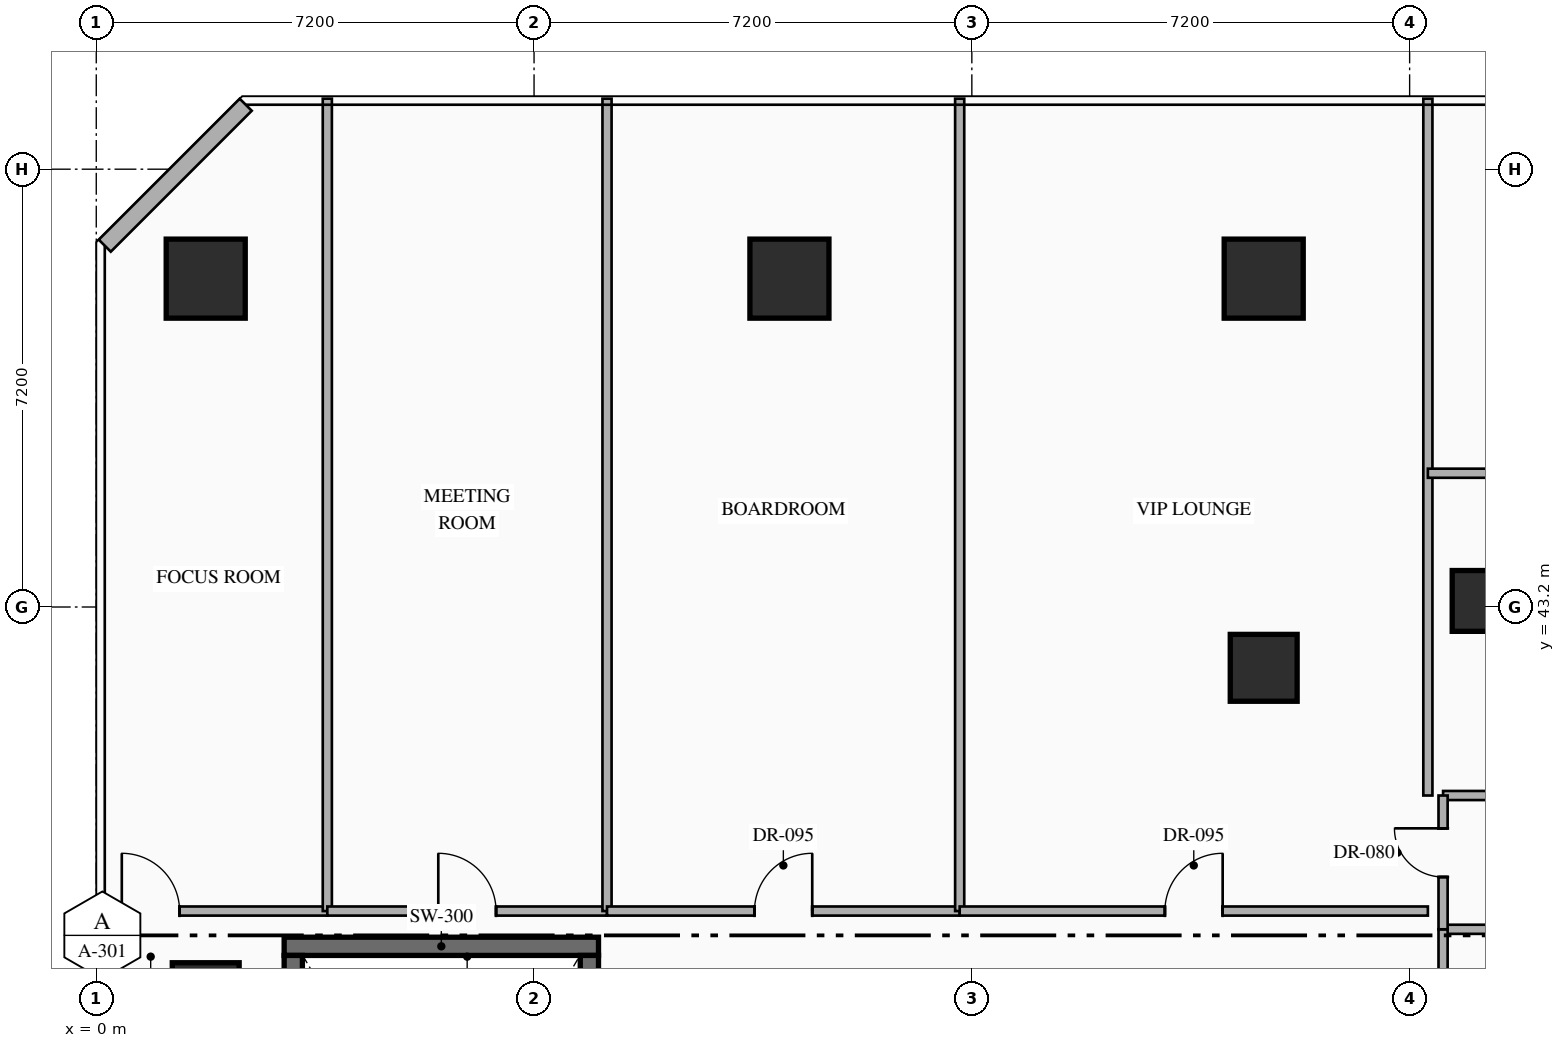
"""IFC4 building model, lengths in metres.
Left out: names, types, materials, properties, quantities, classifications, styles, units other than length and angle.
Written with IfcOpenShell. Run it as: python <this file> out.ifc"""

import sys

from ifc_helpers import new_model, si_unit, direction, frame, frame_2d, origin, origin_2d, place, context, subcontext, project, spatial, rectangle, hollow_rectangle, extrude, element, fill, save


model = new_model("IFC4")
c1 = context("Model", 3, precision=1e-05, world=origin(), true_north=direction((0.0, 1.0)))
c2 = subcontext(c1, "Body", "Model", "MODEL_VIEW")
j1 = project(units=[si_unit("LENGTHUNIT", "METRE"), si_unit("PLANEANGLEUNIT", "RADIAN")], contexts=[c1])
p1 = place(None, origin())
s1 = spatial("IfcSite", under=j1, at=p1, CompositionType="ELEMENT")
p2 = place(p1, origin())
s2 = spatial("IfcBuilding", under=s1, at=p2, CompositionType="ELEMENT")
p3 = place(p2, frame((0.0, 0.0, 16.2)))
s3 = spatial("IfcBuildingStorey", under=s2, at=p3, CompositionType="ELEMENT", Elevation=16.2)
p4 = place(p3, frame((3.09, 37.62, 0.0), z_axis=(0.0, 0.0, 1.0), x_axis=(1.0, 0.0, 0.0)))
e1 = element("IfcWall", 1, at=p4, inside=s3, PredefinedType="SHEAR", context=c2, shape_type="SweptSolid", body=[
    extrude(rectangle(XDim=5.17, YDim=0.3, at=frame_2d((2.585, 0.0))), origin(), (0.0, 0.0, 1.0), 5.4),
])
for number, where, z_axis, x_axis in (
    (2, (3.24, 27.59, 0.0), (0.0, 0.0, 1.0), (0.0, 1.0, 0.0)),
    (3, (8.11, 27.59, 0.0), (0.0, 0.0, 1.0), (0.0, 1.0, 0.0)),
):
    element("IfcWall", number, at=place(p3, frame(where, z_axis=z_axis, x_axis=x_axis)), inside=s3, PredefinedType="SHEAR", context=c2, shape_type="SweptSolid", body=[
        extrude(rectangle(XDim=9.88, YDim=0.3, at=frame_2d((4.94, 0.0))), origin(), (0.0, 0.0, 1.0), 5.4),
    ])
p5 = place(p3, frame((1.8, 48.6, 0.0), z_axis=(0.0, 0.0, 1.0), x_axis=(1.0, 0.0, 0.0)))
e4 = element("IfcColumn", 4, at=p5, inside=s3, PredefinedType="COLUMN", context=c2, shape_type="SweptSolid", body=[
    extrude(rectangle(XDim=1.3, YDim=1.3, at=origin_2d()), origin(), (0.0, 0.0, 1.0), 5.4),
])
p6 = place(p3, frame((1.8, 36.8, 0.0), z_axis=(0.0, 0.0, 1.0), x_axis=(1.0, 0.0, 0.0)))
e5 = element("IfcColumn", 5, at=p6, inside=s3, PredefinedType="COLUMN", context=c2, shape_type="SweptSolid", body=[
    extrude(hollow_rectangle(XDim=1.1, YDim=1.1, WallThickness=0.04, at=origin_2d()), origin(), (0.0, 0.0, 1.0), 5.4),
])
for number, where, z_axis, x_axis in (
    (6, (11.4, 48.6, 0.0), (0.0, 0.0, 1.0), (1.0, 0.0, 0.0)),
    (7, (19.2, 48.6, 0.0), (0.0, 0.0, 1.0), (1.0, 0.0, 0.0)),
):
    element("IfcColumn", number, at=place(p3, frame(where, z_axis=z_axis, x_axis=x_axis)), inside=s3, PredefinedType="COLUMN", context=c2, shape_type="SweptSolid", body=[
        extrude(rectangle(XDim=1.3, YDim=1.3, at=origin_2d()), origin(), (0.0, 0.0, 1.0), 5.4),
    ])
p7 = place(p3, frame((19.2, 42.2, 0.0), z_axis=(0.0, 0.0, 1.0), x_axis=(1.0, 0.0, 0.0)))
e8 = element("IfcColumn", 8, at=p7, inside=s3, PredefinedType="COLUMN", context=c2, shape_type="SweptSolid", body=[
    extrude(hollow_rectangle(XDim=1.1, YDim=1.1, WallThickness=0.04, at=origin_2d()), origin(), (0.0, 0.0, 1.0), 5.4),
])
p8 = place(p3, frame((22.8, 43.3, 0.0), z_axis=(0.0, 0.0, 1.0), x_axis=(1.0, 0.0, 0.0)))
e9 = element("IfcColumn", 9, at=p8, inside=s3, PredefinedType="COLUMN", context=c2, shape_type="SweptSolid", body=[
    extrude(hollow_rectangle(XDim=1.0, YDim=1.0, WallThickness=0.038, at=origin_2d()), origin(), (0.0, 0.0, 1.0), 5.4),
])
p9 = place(p3, frame((0.14, 49.142, 0.0), z_axis=(0.0, 0.0, 1.0), x_axis=(0.707144017911, 0.707069542501, 0.0)))
e10 = element("IfcWall", 10, at=p9, inside=s3, PredefinedType="STANDARD", context=c2, shape_type="SweptSolid", body=[
    extrude(rectangle(XDim=3.278, YDim=0.28, at=frame_2d((1.639, 0.0))), origin(), (0.0, 0.0, 1.0), 5.1),
])
for number, where, z_axis, x_axis in (
    (11, (22.15, 40.1, 0.0), (0.0, 0.0, 1.0), (1.0, 0.0, 0.0)),
    (12, (22.15, 37.9, 0.0), (0.0, 0.0, 1.0), (1.0, 0.0, 0.0)),
):
    element("IfcWall", number, at=place(p3, frame(where, z_axis=z_axis, x_axis=x_axis)), inside=s3, PredefinedType="PARTITIONING", context=c2, shape_type="SweptSolid", body=[
        extrude(rectangle(XDim=3.3, YDim=0.15, at=frame_2d((1.65, 0.0))), origin(), (0.0, 0.0, 1.0), 5.1),
    ])
p10 = place(p3, frame((22.15, 35.7, 0.0), z_axis=(0.0, 0.0, 1.0), x_axis=(0.0, 1.0, 0.0)))
e13 = element("IfcWall", 13, at=p10, inside=s3, PredefinedType="PARTITIONING", context=c2, shape_type="SweptSolid", body=[
    extrude(rectangle(XDim=2.2, YDim=0.15, at=frame_2d((1.1, 0.0))), origin(), (0.0, 0.0, 1.0), 5.1),
])
p11 = place(p10, frame((0.7, 0.0, 0.0)))
e14 = element("IfcOpeningElement", 14, at=p11, cuts=e13, PredefinedType="OPENING", context=c2, shape_type="SweptSolid", body=[
    extrude(rectangle(XDim=0.8, YDim=2.06, at=frame_2d((0.4, 1.03))), frame((0.0, 0.085, 0.0), z_axis=(0.0, -1.0, 0.0), x_axis=(1.0, 0.0, 0.0)), (0.0, 0.0, 1.0), 0.17),
])
p12 = place(p3, frame((22.15, 37.9, 0.0), z_axis=(0.0, 0.0, 1.0), x_axis=(0.0, 1.0, 0.0)))
e15 = element("IfcWall", 15, at=p12, inside=s3, PredefinedType="PARTITIONING", context=c2, shape_type="SweptSolid", body=[
    extrude(rectangle(XDim=2.2, YDim=0.15, at=frame_2d((1.1, 0.0))), origin(), (0.0, 0.0, 1.0), 5.1),
])
p13 = place(p12, frame((0.86, 0.0, 0.0)))
e16 = element("IfcOpeningElement", 16, at=p13, cuts=e15, PredefinedType="OPENING", context=c2, shape_type="SweptSolid", body=[
    extrude(rectangle(XDim=0.8, YDim=2.06, at=frame_2d((0.4, 1.03))), frame((0.0, 0.085, 0.0), z_axis=(0.0, -1.0, 0.0), x_axis=(1.0, 0.0, 0.0)), (0.0, 0.0, 1.0), 0.17),
])
p14 = place(p3, frame((0.04, 38.2, 0.0), z_axis=(0.0, 0.0, 1.0), x_axis=(1.0, 0.0, 0.0)))
e17 = element("IfcWall", 17, at=p14, inside=s3, PredefinedType="PARTITIONING", context=c2, shape_type="SweptSolid", body=[
    extrude(rectangle(XDim=3.76, YDim=0.15, at=frame_2d((1.88, 0.0))), origin(), (0.0, 0.0, 1.0), 5.1),
])
p15 = place(p14, frame((0.38, 0.0, 0.0)))
e18 = element("IfcOpeningElement", 18, at=p15, cuts=e17, PredefinedType="OPENING", context=c2, shape_type="SweptSolid", body=[
    extrude(rectangle(XDim=0.95, YDim=2.15, at=frame_2d((0.475, 1.075))), frame((0.0, 0.085, 0.0), z_axis=(0.0, -1.0, 0.0), x_axis=(1.0, 0.0, 0.0)), (0.0, 0.0, 1.0), 0.17),
])
p16 = place(p3, frame((3.8, 38.2, 0.0), z_axis=(0.0, 0.0, 1.0), x_axis=(0.0, 1.0, 0.0)))
e19 = element("IfcWall", 19, at=p16, inside=s3, PredefinedType="PARTITIONING", context=c2, shape_type="SweptSolid", body=[
    extrude(rectangle(XDim=13.36, YDim=0.15, at=frame_2d((6.68, 0.0))), origin(), (0.0, 0.0, 1.0), 5.1),
])
p17 = place(p3, frame((3.8, 38.2, 0.0), z_axis=(0.0, 0.0, 1.0), x_axis=(1.0, 0.0, 0.0)))
e20 = element("IfcWall", 20, at=p17, inside=s3, PredefinedType="PARTITIONING", context=c2, shape_type="SweptSolid", body=[
    extrude(rectangle(XDim=4.6, YDim=0.15, at=frame_2d((2.3, 0.0))), origin(), (0.0, 0.0, 1.0), 5.1),
])
p18 = place(p17, frame((1.825, 0.0, 0.0)))
e21 = element("IfcOpeningElement", 21, at=p18, cuts=e20, PredefinedType="OPENING", context=c2, shape_type="SweptSolid", body=[
    extrude(rectangle(XDim=0.95, YDim=2.15, at=frame_2d((0.475, 1.075))), frame((0.0, 0.085, 0.0), z_axis=(0.0, -1.0, 0.0), x_axis=(1.0, 0.0, 0.0)), (0.0, 0.0, 1.0), 0.17),
])
p19 = place(p3, frame((8.4, 38.2, 0.0), z_axis=(0.0, 0.0, 1.0), x_axis=(0.0, 1.0, 0.0)))
e22 = element("IfcWall", 22, at=p19, inside=s3, PredefinedType="PARTITIONING", context=c2, shape_type="SweptSolid", body=[
    extrude(rectangle(XDim=13.36, YDim=0.15, at=frame_2d((6.68, 0.0))), origin(), (0.0, 0.0, 1.0), 5.1),
])
p20 = place(p3, frame((8.4, 38.2, 0.0), z_axis=(0.0, 0.0, 1.0), x_axis=(1.0, 0.0, 0.0)))
e23 = element("IfcWall", 23, at=p20, inside=s3, PredefinedType="PARTITIONING", context=c2, shape_type="SweptSolid", body=[
    extrude(rectangle(XDim=5.8, YDim=0.15, at=frame_2d((2.9, 0.0))), origin(), (0.0, 0.0, 1.0), 5.1),
])
p21 = place(p20, frame((2.425, 0.0, 0.0)))
e24 = element("IfcOpeningElement", 24, at=p21, cuts=e23, PredefinedType="OPENING", context=c2, shape_type="SweptSolid", body=[
    extrude(rectangle(XDim=0.95, YDim=2.15, at=frame_2d((0.475, 1.075))), frame((0.0, 0.085, 0.0), z_axis=(0.0, -1.0, 0.0), x_axis=(1.0, 0.0, 0.0)), (0.0, 0.0, 1.0), 0.17),
])
p22 = place(p3, frame((14.2, 38.2, 0.0), z_axis=(0.0, 0.0, 1.0), x_axis=(0.0, 1.0, 0.0)))
e25 = element("IfcWall", 25, at=p22, inside=s3, PredefinedType="PARTITIONING", context=c2, shape_type="SweptSolid", body=[
    extrude(rectangle(XDim=13.36, YDim=0.15, at=frame_2d((6.68, 0.0))), origin(), (0.0, 0.0, 1.0), 5.1),
])
p23 = place(p3, frame((14.2, 38.2, 0.0), z_axis=(0.0, 0.0, 1.0), x_axis=(1.0, 0.0, 0.0)))
e26 = element("IfcWall", 26, at=p23, inside=s3, PredefinedType="PARTITIONING", context=c2, shape_type="SweptSolid", body=[
    extrude(rectangle(XDim=7.7, YDim=0.15, at=frame_2d((3.85, 0.0))), origin(), (0.0, 0.0, 1.0), 5.1),
])
p24 = place(p23, frame((3.375, 0.0, 0.0)))
e27 = element("IfcOpeningElement", 27, at=p24, cuts=e26, PredefinedType="OPENING", context=c2, shape_type="SweptSolid", body=[
    extrude(rectangle(XDim=0.95, YDim=2.15, at=frame_2d((0.475, 1.075))), frame((0.0, 0.085, 0.0), z_axis=(0.0, -1.0, 0.0), x_axis=(1.0, 0.0, 0.0)), (0.0, 0.0, 1.0), 0.17),
])
p25 = place(p3, frame((21.9, 40.1, 0.0), z_axis=(0.0, 0.0, 1.0), x_axis=(0.0, 1.0, 0.0)))
e28 = element("IfcWall", 28, at=p25, inside=s3, PredefinedType="PARTITIONING", context=c2, shape_type="SweptSolid", body=[
    extrude(rectangle(XDim=11.46, YDim=0.15, at=frame_2d((5.73, 0.0))), origin(), (0.0, 0.0, 1.0), 5.1),
])
p26 = place(p3, frame((21.9, 45.4, 0.0), z_axis=(0.0, 0.0, 1.0), x_axis=(1.0, 0.0, 0.0)))
e29 = element("IfcWall", 29, at=p26, inside=s3, PredefinedType="PARTITIONING", context=c2, shape_type="SweptSolid", body=[
    extrude(rectangle(XDim=9.3, YDim=0.15, at=frame_2d((4.65, 0.0))), origin(), (0.0, 0.0, 1.0), 5.1),
])
p27 = place(p26, frame((5.658, 0.0, 0.0)))
e30 = element("IfcOpeningElement", 30, at=p27, cuts=e29, PredefinedType="OPENING", context=c2, shape_type="SweptSolid", body=[
    extrude(rectangle(XDim=1.0, YDim=2.15, at=frame_2d((0.5, 1.075))), frame((0.0, 0.085, 0.0), z_axis=(0.0, -1.0, 0.0), x_axis=(1.0, 0.0, 0.0)), (0.0, 0.0, 1.0), 0.17),
])
p28 = place(p13, origin())
e31 = element("IfcDoor", 31, at=p28, inside=s3, OperationType="SINGLE_SWING_RIGHT", PredefinedType="DOOR", context=c2, shape_type="SweptSolid", body=[
    extrude(rectangle(XDim=0.8, YDim=2.06, at=frame_2d((0.4, 1.03))), frame((0.0, 0.025, 0.0), z_axis=(0.0, -1.0, 0.0), x_axis=(1.0, 0.0, 0.0)), (0.0, 0.0, 1.0), 0.05),
])
fill(e16, e31)
p29 = place(p15, origin())
e32 = element("IfcDoor", 32, at=p29, inside=s3, OperationType="SINGLE_SWING_LEFT", PredefinedType="DOOR", context=c2, shape_type="SweptSolid", body=[
    extrude(rectangle(XDim=0.95, YDim=2.15, at=frame_2d((0.475, 1.075))), frame((0.0, 0.025, 0.0), z_axis=(0.0, -1.0, 0.0), x_axis=(1.0, 0.0, 0.0)), (0.0, 0.0, 1.0), 0.05),
])
fill(e18, e32)
p30 = place(p18, origin())
e33 = element("IfcDoor", 33, at=p30, inside=s3, OperationType="SINGLE_SWING_LEFT", PredefinedType="DOOR", context=c2, shape_type="SweptSolid", body=[
    extrude(rectangle(XDim=0.95, YDim=2.15, at=frame_2d((0.475, 1.075))), frame((0.0, 0.025, 0.0), z_axis=(0.0, -1.0, 0.0), x_axis=(1.0, 0.0, 0.0)), (0.0, 0.0, 1.0), 0.05),
])
fill(e21, e33)
p31 = place(p21, origin())
e34 = element("IfcDoor", 34, at=p31, inside=s3, OperationType="SINGLE_SWING_RIGHT", PredefinedType="DOOR", context=c2, shape_type="SweptSolid", body=[
    extrude(rectangle(XDim=0.95, YDim=2.15, at=frame_2d((0.475, 1.075))), frame((0.0, 0.025, 0.0), z_axis=(0.0, -1.0, 0.0), x_axis=(1.0, 0.0, 0.0)), (0.0, 0.0, 1.0), 0.05),
])
fill(e24, e34)
p32 = place(p24, origin())
e35 = element("IfcDoor", 35, at=p32, inside=s3, OperationType="SINGLE_SWING_RIGHT", PredefinedType="DOOR", context=c2, shape_type="SweptSolid", body=[
    extrude(rectangle(XDim=0.95, YDim=2.15, at=frame_2d((0.475, 1.075))), frame((0.0, 0.025, 0.0), z_axis=(0.0, -1.0, 0.0), x_axis=(1.0, 0.0, 0.0)), (0.0, 0.0, 1.0), 0.05),
])
fill(e27, e35)
save(model, sys.argv[1])
